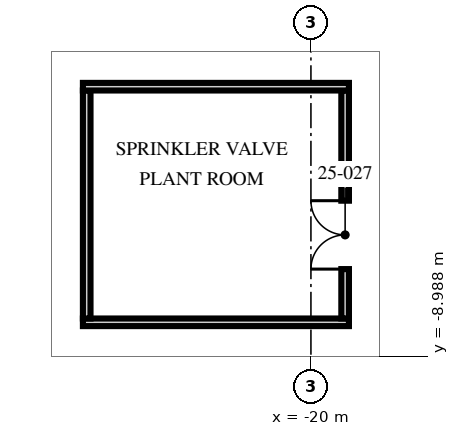
"""IFC4 building model, lengths in metres.
Left out: names, types, materials, properties, quantities, classifications, styles, units other than length and angle.
Written with IfcOpenShell. Run it as: python <this file> out.ifc"""

import sys

from ifc_helpers import new_model, si_unit, direction, frame, frame_2d, origin, origin_2d, place, context, subcontext, project, spatial, rectangle, hollow_rectangle, extrude, element, fill, save


model = new_model("IFC4")
c1 = context("Model", 3, precision=1e-05, world=origin(), true_north=direction((0.0, 1.0)))
c2 = subcontext(c1, "Body", "Model", "MODEL_VIEW")
j1 = project(units=[si_unit("LENGTHUNIT", "METRE"), si_unit("PLANEANGLEUNIT", "RADIAN")], contexts=[c1])
p1 = place(None, origin())
s1 = spatial("IfcSite", under=j1, at=p1, CompositionType="ELEMENT")
p2 = place(p1, origin())
s2 = spatial("IfcBuilding", under=s1, at=p2, CompositionType="ELEMENT")
p3 = place(p2, frame((0.0, 0.0, 99.75)))
s3 = spatial("IfcBuildingStorey", under=s2, at=p3, CompositionType="ELEMENT", Elevation=99.75)
p4 = place(p3, frame((-29.8, -10.0, -0.65), z_axis=(0.332963994967, 0.103601510687, 0.937230870724), x_axis=(-0.034712905596, 0.994618884766, -0.097612951251)))
e1 = element("IfcColumn", 1, at=p4, inside=s3, PredefinedType="COLUMN", context=c2, shape_type="SweptSolid", body=[
    extrude(hollow_rectangle(XDim=3.2, YDim=1.8, WallThickness=0.2, at=origin_2d()), origin(), (0.0, 0.0, 1.0), 8.109),
])
p5 = place(p3, frame((-29.8, 0.0, -0.65), z_axis=(0.334765406017, 0.0, 0.942301503201), x_axis=(0.0, 1.0, 0.0)))
e2 = element("IfcColumn", 2, at=p5, inside=s3, PredefinedType="COLUMN", context=c2, shape_type="SweptSolid", body=[
    extrude(hollow_rectangle(XDim=3.2, YDim=1.8, WallThickness=0.2, at=origin_2d()), origin(), (0.0, 0.0, 1.0), 8.065),
])
p6 = place(p3, frame((-26.0, -8.1, 0.0), z_axis=(0.0, 0.0, 1.0), x_axis=(1.0, 0.0, 0.0)))
e3 = element("IfcWall", 3, at=p6, inside=s3, PredefinedType="SOLIDWALL", context=c2, shape_type="SweptSolid", body=[
    extrude(rectangle(XDim=7.0, YDim=0.2, at=frame_2d((3.5, 0.0))), origin(), (0.0, 0.0, 1.0), 7.25),
])
p7 = place(p3, frame((-25.9, -8.0, 0.0), z_axis=(0.0, 0.0, 1.0), x_axis=(0.0, 1.0, 0.0)))
e4 = element("IfcWall", 4, at=p7, inside=s3, PredefinedType="SOLIDWALL", context=c2, shape_type="SweptSolid", body=[
    extrude(rectangle(XDim=6.0, YDim=0.2, at=frame_2d((3.0, 0.0))), origin(), (0.0, 0.0, 1.0), 6.46),
])
p8 = place(p3, frame((-19.1, -8.0, 0.0), z_axis=(0.0, 0.0, 1.0), x_axis=(0.0, 1.0, 0.0)))
e5 = element("IfcWall", 5, at=p8, inside=s3, PredefinedType="SOLIDWALL", context=c2, shape_type="SweptSolid", body=[
    extrude(rectangle(XDim=6.0, YDim=0.2, at=frame_2d((3.0, 0.0))), origin(), (0.0, 0.0, 1.0), 6.46),
])
p9 = place(p8, frame((1.3, 0.0, 0.0)))
e6 = element("IfcOpeningElement", 6, at=p9, cuts=e5, PredefinedType="OPENING", context=c2, shape_type="SweptSolid", body=[
    extrude(rectangle(XDim=1.8, YDim=2.4, at=frame_2d((0.9, 1.2))), frame((0.0, 0.11, 0.0), z_axis=(0.0, -1.0, 0.0), x_axis=(1.0, 0.0, 0.0)), (0.0, 0.0, 1.0), 0.22),
])
p10 = place(p3, frame((-26.0, -1.9, 0.0), z_axis=(0.0, 0.0, 1.0), x_axis=(1.0, 0.0, 0.0)))
e7 = element("IfcWall", 7, at=p10, inside=s3, PredefinedType="SOLIDWALL", context=c2, shape_type="SweptSolid", body=[
    extrude(rectangle(XDim=7.0, YDim=0.2, at=frame_2d((3.5, 0.0))), origin(), (0.0, 0.0, 1.0), 7.25),
])
p11 = place(p9, origin())
e8 = element("IfcDoor", 8, at=p11, inside=s3, OperationType="DOUBLE_DOOR_SINGLE_SWING", PredefinedType="DOOR", context=c2, shape_type="SweptSolid", body=[
    extrude(rectangle(XDim=1.8, YDim=2.4, at=frame_2d((0.9, 1.2))), frame((0.0, 0.025, 0.0), z_axis=(0.0, -1.0, 0.0), x_axis=(1.0, 0.0, 0.0)), (0.0, 0.0, 1.0), 0.05),
])
fill(e6, e8)
save(model, sys.argv[1])
